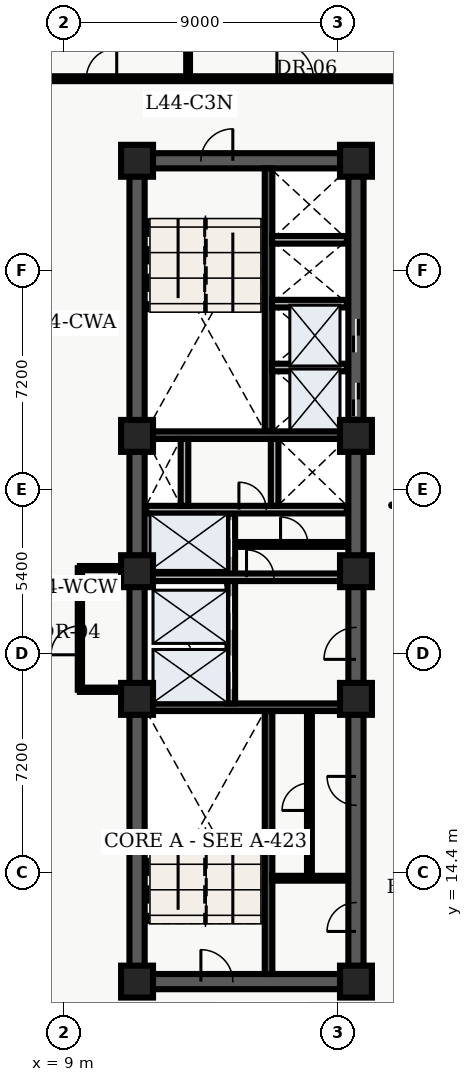
"""IFC4 building model, lengths in metres.
Left out: names, types, materials, properties, quantities, classifications, styles, units other than length and angle.
Written with IfcOpenShell. Run it as: python <this file> out.ifc"""

import sys

from ifc_helpers import new_model, entity, si_unit, converted_unit, direction, frame, origin_with_axes, origin_2d_with_axis, place, context, subcontext, project, spatial, polyline, rectangle, outline, extrude, element, fill, save


model = new_model("IFC4")
c1 = context("Model", 3, precision=1e-05, world=origin_with_axes(), true_north=direction((0.0, 1.0)))
c2 = subcontext(c1, "Body", "Model", "MODEL_VIEW")
j1 = project(units=[si_unit("LENGTHUNIT", "METRE"), converted_unit("PLANEANGLEUNIT", "DEGREE", entity("IfcPlaneAngleMeasure", 0.017), si_unit("PLANEANGLEUNIT", "RADIAN"), dimensions=[0, 0, 0, 0, 0, 0, 0])], contexts=[c1])
p1 = place(None, origin_with_axes())
s1 = spatial("IfcSite", under=j1, at=p1, CompositionType="ELEMENT")
p2 = place(p1, origin_with_axes())
s2 = spatial("IfcBuilding", under=s1, at=p2, CompositionType="ELEMENT")
p3 = place(p2, frame((0.0, 0.0, 179.7), z_axis=(0.0, 0.0, 1.0), x_axis=(1.0, 0.0, 0.0)))
s3 = spatial("IfcBuildingStorey", under=s2, at=p3, CompositionType="ELEMENT", Elevation=179.7)
p4 = place(p3, frame((11.4, 10.8, 0.0), z_axis=(0.0, 0.0, 1.0), x_axis=(0.0, 1.0, 0.0)))
e1 = element("IfcWall", 1, at=p4, inside=s3, PredefinedType="SHEAR", context=c2, shape_type="SweptSolid", body=[
    extrude(outline(polyline([(0.0, -0.25), (27.0, -0.25), (27.0, 0.25), (0.0, 0.25), (0.0, -0.25)])), origin_with_axes(), (0.0, 0.0, 1.0), 3.66),
])
p5 = place(p3, frame((11.4, 10.8, 0.0), z_axis=(0.0, 0.0, 1.0), x_axis=(1.0, 0.0, 0.0)))
e2 = element("IfcWall", 2, at=p5, inside=s3, PredefinedType="SHEAR", context=c2, shape_type="SweptSolid", body=[
    extrude(outline(polyline([(0.0, -0.25), (7.2, -0.25), (7.2, 0.25), (0.0, 0.25), (0.0, -0.25)])), origin_with_axes(), (0.0, 0.0, 1.0), 3.66),
])
p6 = place(p5, frame((2.625, 0.0, 0.0), z_axis=(0.0, 0.0, 1.0), x_axis=(1.0, 0.0, 0.0)))
e3 = element("IfcOpeningElement", 3, at=p6, cuts=e2, PredefinedType="OPENING", context=c2, shape_type="SweptSolid", body=[
    extrude(rectangle(XDim=1.05, YDim=0.52, at=origin_2d_with_axis()), origin_with_axes(), (0.0, 0.0, 1.0), 2.15),
])
p7 = place(p3, frame((11.4, 37.8, 0.0), z_axis=(0.0, 0.0, 1.0), x_axis=(1.0, 0.0, 0.0)))
e4 = element("IfcWall", 4, at=p7, inside=s3, PredefinedType="SHEAR", context=c2, shape_type="SweptSolid", body=[
    extrude(outline(polyline([(0.0, -0.25), (7.2, -0.25), (7.2, 0.25), (0.0, 0.25), (0.0, -0.25)])), origin_with_axes(), (0.0, 0.0, 1.0), 3.66),
])
p8 = place(p7, frame((2.625, 0.0, 0.0), z_axis=(0.0, 0.0, 1.0), x_axis=(1.0, 0.0, 0.0)))
e5 = element("IfcOpeningElement", 5, at=p8, cuts=e4, PredefinedType="OPENING", context=c2, shape_type="SweptSolid", body=[
    extrude(rectangle(XDim=1.05, YDim=0.52, at=origin_2d_with_axis()), origin_with_axes(), (0.0, 0.0, 1.0), 2.15),
])
p9 = place(p3, frame((18.6, 10.8, 0.0), z_axis=(0.0, 0.0, 1.0), x_axis=(0.0, 1.0, 0.0)))
e6 = element("IfcWall", 6, at=p9, inside=s3, PredefinedType="SHEAR", context=c2, shape_type="SweptSolid", body=[
    extrude(outline(polyline([(0.0, -0.25), (13.5, -0.25), (13.5, 0.25), (0.0, 0.25), (0.0, -0.25)])), origin_with_axes(), (0.0, 0.0, 1.0), 3.66),
])
p10 = place(p9, frame((11.125, 0.0, 0.0), z_axis=(0.0, 0.0, 1.0), x_axis=(1.0, 0.0, 0.0)))
e7 = element("IfcOpeningElement", 7, at=p10, cuts=e6, PredefinedType="OPENING", context=c2, shape_type="SweptSolid", body=[
    extrude(rectangle(XDim=1.05, YDim=0.52, at=origin_2d_with_axis()), origin_with_axes(), (0.0, 0.0, 1.0), 2.15),
])
p11 = place(p9, frame((2.125, 0.0, 0.0), z_axis=(0.0, 0.0, 1.0), x_axis=(1.0, 0.0, 0.0)))
e8 = element("IfcOpeningElement", 8, at=p11, cuts=e6, PredefinedType="OPENING", context=c2, shape_type="SweptSolid", body=[
    extrude(rectangle(XDim=0.95, YDim=0.52, at=origin_2d_with_axis()), origin_with_axes(), (0.0, 0.0, 1.0), 2.15),
])
p12 = place(p9, frame((6.275, 0.0, 0.0), z_axis=(0.0, 0.0, 1.0), x_axis=(1.0, 0.0, 0.0)))
e9 = element("IfcOpeningElement", 9, at=p12, cuts=e6, PredefinedType="OPENING", context=c2, shape_type="SweptSolid", body=[
    extrude(rectangle(XDim=0.95, YDim=0.52, at=origin_2d_with_axis()), origin_with_axes(), (0.0, 0.0, 1.0), 2.15),
])
p13 = place(p3, frame((18.6, 24.3, 0.0), z_axis=(0.0, 0.0, 1.0), x_axis=(0.0, 1.0, 0.0)))
e10 = element("IfcWall", 10, at=p13, inside=s3, PredefinedType="SHEAR", context=c2, shape_type="SweptSolid", body=[
    extrude(outline(polyline([(0.0, -0.25), (13.5, -0.25), (13.5, 0.25), (0.0, 0.25), (0.0, -0.25)])), origin_with_axes(), (0.0, 0.0, 1.0), 3.66),
])
p14 = place(p13, frame((5.65, 0.0, 0.0), z_axis=(0.0, 0.0, 1.0), x_axis=(1.0, 0.0, 0.0)))
e11 = element("IfcOpeningElement", 11, at=p14, cuts=e10, PredefinedType="OPENING", context=c2, shape_type="SweptSolid", body=[
    extrude(rectangle(XDim=1.1, YDim=0.52, at=origin_2d_with_axis()), origin_with_axes(), (0.0, 0.0, 1.0), 2.15),
])
p15 = place(p13, frame((7.75, 0.0, 0.0), z_axis=(0.0, 0.0, 1.0), x_axis=(1.0, 0.0, 0.0)))
e12 = element("IfcOpeningElement", 12, at=p15, cuts=e10, PredefinedType="OPENING", context=c2, shape_type="SweptSolid", body=[
    extrude(rectangle(XDim=1.1, YDim=0.52, at=origin_2d_with_axis()), origin_with_axes(), (0.0, 0.0, 1.0), 2.15),
])
p16 = place(p3, frame((15.725, 11.05, 0.0), z_axis=(0.0, 0.0, 1.0), x_axis=(0.0, 1.0, 0.0)))
e13 = element("IfcWall", 13, at=p16, inside=s3, PredefinedType="SHEAR", context=c2, shape_type="SweptSolid", body=[
    extrude(outline(polyline([(0.0, -0.125), (8.65, -0.125), (8.65, 0.125), (0.0, 0.125), (0.0, -0.125)])), origin_with_axes(), (0.0, 0.0, 1.0), 3.66),
])
p17 = place(p3, frame((11.65, 19.825, 0.0), z_axis=(0.0, 0.0, 1.0), x_axis=(1.0, 0.0, 0.0)))
e14 = element("IfcWall", 14, at=p17, inside=s3, PredefinedType="SHEAR", context=c2, shape_type="SweptSolid", body=[
    extrude(outline(polyline([(0.0, -0.125), (6.7, -0.125), (6.7, 0.125), (0.0, 0.125), (0.0, -0.125)])), origin_with_axes(), (0.0, 0.0, 1.0), 3.66),
])
p18 = place(p3, frame((15.725, 28.9, 0.0), z_axis=(0.0, 0.0, 1.0), x_axis=(0.0, 1.0, 0.0)))
e15 = element("IfcWall", 15, at=p18, inside=s3, PredefinedType="SHEAR", context=c2, shape_type="SweptSolid", body=[
    extrude(outline(polyline([(0.0, -0.125), (8.65, -0.125), (8.65, 0.125), (0.0, 0.125), (0.0, -0.125)])), origin_with_axes(), (0.0, 0.0, 1.0), 3.66),
])
p19 = place(p3, frame((11.65, 28.775, 0.0), z_axis=(0.0, 0.0, 1.0), x_axis=(1.0, 0.0, 0.0)))
e16 = element("IfcWall", 16, at=p19, inside=s3, PredefinedType="SHEAR", context=c2, shape_type="SweptSolid", body=[
    extrude(outline(polyline([(0.0, -0.125), (6.7, -0.125), (6.7, 0.125), (0.0, 0.125), (0.0, -0.125)])), origin_with_axes(), (0.0, 0.0, 1.0), 3.66),
])
p20 = place(p3, frame((14.5, 19.95, 0.0), z_axis=(0.0, 0.0, 1.0), x_axis=(0.0, 1.0, 0.0)))
e17 = element("IfcWall", 17, at=p20, inside=s3, PredefinedType="SOLIDWALL", context=c2, shape_type="SweptSolid", body=[
    extrude(outline(polyline([(0.0, -0.125), (6.25, -0.125), (6.25, 0.125), (0.0, 0.125), (0.0, -0.125)])), origin_with_axes(), (0.0, 0.0, 1.0), 2.7),
])
p21 = place(p20, frame((1.025, 0.0, 0.0), z_axis=(0.0, 0.0, 1.0), x_axis=(1.0, 0.0, 0.0)))
e18 = element("IfcOpeningElement", 18, at=p21, cuts=e17, PredefinedType="OPENING", context=c2, shape_type="SweptSolid", body=[
    extrude(rectangle(XDim=1.1, YDim=0.27, at=origin_2d_with_axis()), origin_with_axes(), (0.0, 0.0, 1.0), 2.15),
])
p22 = place(p20, frame((2.975, 0.0, 0.0), z_axis=(0.0, 0.0, 1.0), x_axis=(1.0, 0.0, 0.0)))
e19 = element("IfcOpeningElement", 19, at=p22, cuts=e17, PredefinedType="OPENING", context=c2, shape_type="SweptSolid", body=[
    extrude(rectangle(XDim=1.1, YDim=0.27, at=origin_2d_with_axis()), origin_with_axes(), (0.0, 0.0, 1.0), 2.15),
])
p23 = place(p20, frame((5.425, 0.0, 0.0), z_axis=(0.0, 0.0, 1.0), x_axis=(1.0, 0.0, 0.0)))
e20 = element("IfcOpeningElement", 20, at=p23, cuts=e17, PredefinedType="OPENING", context=c2, shape_type="SweptSolid", body=[
    extrude(rectangle(XDim=1.2, YDim=0.27, at=origin_2d_with_axis()), origin_with_axes(), (0.0, 0.0, 1.0), 2.15),
])
p24 = place(p3, frame((11.7, 24.1, 0.0), z_axis=(0.0, 0.0, 1.0), x_axis=(1.0, 0.0, 0.0)))
e21 = element("IfcWall", 21, at=p24, inside=s3, PredefinedType="SOLIDWALL", context=c2, shape_type="SweptSolid", body=[
    extrude(outline(polyline([(0.0, -0.125), (6.6, -0.125), (6.6, 0.125), (0.0, 0.125), (0.0, -0.125)])), origin_with_axes(), (0.0, 0.0, 1.0), 2.7),
])
p25 = place(p24, frame((3.75, 0.0, 0.0), z_axis=(0.0, 0.0, 1.0), x_axis=(1.0, 0.0, 0.0)))
e22 = element("IfcOpeningElement", 22, at=p25, cuts=e21, PredefinedType="OPENING", context=c2, shape_type="SweptSolid", body=[
    extrude(rectangle(XDim=0.9, YDim=0.27, at=origin_2d_with_axis()), origin_with_axes(), (0.0, 0.0, 1.0), 2.15),
])
p26 = place(p3, frame((11.7, 26.325, 0.0), z_axis=(0.0, 0.0, 1.0), x_axis=(1.0, 0.0, 0.0)))
e23 = element("IfcWall", 23, at=p26, inside=s3, PredefinedType="SOLIDWALL", context=c2, shape_type="SweptSolid", body=[
    extrude(outline(polyline([(0.0, -0.125), (6.6, -0.125), (6.6, 0.125), (0.0, 0.125), (0.0, -0.125)])), origin_with_axes(), (0.0, 0.0, 1.0), 2.7),
])
p27 = place(p26, frame((3.5, 0.0, 0.0), z_axis=(0.0, 0.0, 1.0), x_axis=(1.0, 0.0, 0.0)))
e24 = element("IfcOpeningElement", 24, at=p27, cuts=e23, PredefinedType="OPENING", context=c2, shape_type="SweptSolid", body=[
    extrude(rectangle(XDim=0.9, YDim=0.27, at=origin_2d_with_axis()), origin_with_axes(), (0.0, 0.0, 1.0), 2.15),
])
for number, where, z_axis, x_axis in (
    (25, (12.96, 26.45, 0.0), (0.0, 0.0, 1.0), (0.0, 1.0, 0.0)),
    (26, (15.925, 26.45, 0.0), (0.0, 0.0, 1.0), (0.0, 1.0, 0.0)),
):
    element("IfcWall", number, at=place(p3, frame(where, z_axis=z_axis, x_axis=x_axis)), inside=s3, PredefinedType="SOLIDWALL", context=c2, shape_type="SweptSolid", body=[
        extrude(outline(polyline([(0.0, -0.125), (2.2, -0.125), (2.2, 0.125), (0.0, 0.125), (0.0, -0.125)])), origin_with_axes(), (0.0, 0.0, 1.0), 2.7),
    ])
for number, where, z_axis, x_axis in (
    (27, (11.4, 10.8, 0.0), (0.0, 0.0, 1.0), (1.0, 0.0, 0.0)),
    (28, (11.4, 20.1, 0.0), (0.0, 0.0, 1.0), (1.0, 0.0, 0.0)),
    (29, (11.4, 24.3, 0.0), (0.0, 0.0, 1.0), (1.0, 0.0, 0.0)),
    (30, (11.4, 28.75, 0.0), (0.0, 0.0, 1.0), (1.0, 0.0, 0.0)),
    (31, (11.4, 37.8, 0.0), (0.0, 0.0, 1.0), (1.0, 0.0, 0.0)),
    (32, (18.6, 10.8, 0.0), (0.0, 0.0, 1.0), (1.0, 0.0, 0.0)),
    (33, (18.6, 20.1, 0.0), (0.0, 0.0, 1.0), (1.0, 0.0, 0.0)),
    (34, (18.6, 24.3, 0.0), (0.0, 0.0, 1.0), (1.0, 0.0, 0.0)),
    (35, (18.6, 28.75, 0.0), (0.0, 0.0, 1.0), (1.0, 0.0, 0.0)),
    (36, (18.6, 37.8, 0.0), (0.0, 0.0, 1.0), (1.0, 0.0, 0.0)),
):
    element("IfcColumn", number, at=place(p3, frame(where, z_axis=z_axis, x_axis=x_axis)), inside=s3, PredefinedType="COLUMN", context=c2, shape_type="SweptSolid", body=[
        extrude(rectangle(XDim=1.05, YDim=1.05, at=origin_2d_with_axis()), origin_with_axes(), (0.0, 0.0, 1.0), 3.9),
    ])
p28 = place(p3, frame((14.62, 25.18, 0.0), z_axis=(0.0, 0.0, 1.0), x_axis=(1.0, 0.0, 0.0)))
e37 = element("IfcWall", 37, at=p28, inside=s3, PredefinedType="PARTITIONING", context=c2, shape_type="SweptSolid", body=[
    extrude(outline(polyline([(0.0, -0.08), (3.68, -0.08), (3.68, 0.08), (0.0, 0.08), (0.0, -0.08)])), origin_with_axes(), (0.0, 0.0, 1.0), 2.7),
])
p29 = place(p28, frame((1.95, 0.0, 0.0), z_axis=(0.0, 0.0, 1.0), x_axis=(1.0, 0.0, 0.0)))
e38 = element("IfcOpeningElement", 38, at=p29, cuts=e37, PredefinedType="OPENING", context=c2, shape_type="SweptSolid", body=[
    extrude(rectangle(XDim=0.9, YDim=0.18, at=origin_2d_with_axis()), origin_with_axes(), (0.0, 0.0, 1.0), 2.15),
])
p30 = place(p3, frame((15.84, 14.2, 0.0), z_axis=(0.0, 0.0, 1.0), x_axis=(1.0, 0.0, 0.0)))
e39 = element("IfcWall", 39, at=p30, inside=s3, PredefinedType="PARTITIONING", context=c2, shape_type="SweptSolid", body=[
    extrude(outline(polyline([(0.0, -0.08), (2.46, -0.08), (2.46, 0.08), (0.0, 0.08), (0.0, -0.08)])), origin_with_axes(), (0.0, 0.0, 1.0), 2.7),
])
p31 = place(p3, frame((17.07, 14.28, 0.0), z_axis=(0.0, 0.0, 1.0), x_axis=(0.0, 1.0, 0.0)))
e40 = element("IfcWall", 40, at=p31, inside=s3, PredefinedType="PARTITIONING", context=c2, shape_type="SweptSolid", body=[
    extrude(outline(polyline([(0.0, -0.08), (5.42, -0.08), (5.42, 0.08), (0.0, 0.08), (0.0, -0.08)])), origin_with_axes(), (0.0, 0.0, 1.0), 2.7),
])
p32 = place(p31, frame((2.6, 0.0, 0.0), z_axis=(0.0, 0.0, 1.0), x_axis=(1.0, 0.0, 0.0)))
e41 = element("IfcOpeningElement", 41, at=p32, cuts=e40, PredefinedType="OPENING", context=c2, shape_type="SweptSolid", body=[
    extrude(rectangle(XDim=0.9, YDim=0.18, at=origin_2d_with_axis()), origin_with_axes(), (0.0, 0.0, 1.0), 2.15),
])
for number, where, z_axis, x_axis in (
    (42, (15.84, 31.0, 0.0), (0.0, 0.0, 1.0), (1.0, 0.0, 0.0)),
    (43, (15.84, 33.1, 0.0), (0.0, 0.0, 1.0), (1.0, 0.0, 0.0)),
    (44, (15.84, 35.2, 0.0), (0.0, 0.0, 1.0), (1.0, 0.0, 0.0)),
):
    element("IfcWall", number, at=place(p3, frame(where, z_axis=z_axis, x_axis=x_axis)), inside=s3, PredefinedType="SOLIDWALL", context=c2, shape_type="SweptSolid", body=[
        extrude(outline(polyline([(0.0, -0.125), (2.46, -0.125), (2.46, 0.125), (0.0, 0.125), (0.0, -0.125)])), origin_with_axes(), (0.0, 0.0, 1.0), 2.7),
    ])
p33 = place(p3, frame((9.52, 20.4, 0.0), z_axis=(0.0, 0.0, 1.0), x_axis=(0.0, 1.0, 0.0)))
e45 = element("IfcWall", 45, at=p33, inside=s3, PredefinedType="PARTITIONING", context=c2, shape_type="SweptSolid", body=[
    extrude(outline(polyline([(0.0, -0.07), (4.0, -0.07), (4.0, 0.07), (0.0, 0.07), (0.0, -0.07)])), origin_with_axes(), (0.0, 0.0, 1.0), 2.7),
])
p34 = place(p33, frame((1.625, 0.0, 0.0), z_axis=(0.0, 0.0, 1.0), x_axis=(1.0, 0.0, 0.0)))
e46 = element("IfcOpeningElement", 46, at=p34, cuts=e45, PredefinedType="OPENING", context=c2, shape_type="SweptSolid", body=[
    extrude(rectangle(XDim=0.95, YDim=0.16, at=origin_2d_with_axis()), origin_with_axes(), (0.0, 0.0, 1.0), 2.15),
])
for number, where, z_axis, x_axis in (
    (47, (9.52, 20.4, 0.0), (0.0, 0.0, 1.0), (1.0, 0.0, 0.0)),
    (48, (9.52, 24.4, 0.0), (0.0, 0.0, 1.0), (1.0, 0.0, 0.0)),
):
    element("IfcWall", number, at=place(p3, frame(where, z_axis=z_axis, x_axis=x_axis)), inside=s3, PredefinedType="PARTITIONING", context=c2, shape_type="SweptSolid", body=[
        extrude(outline(polyline([(0.0, -0.07), (1.58, -0.07), (1.58, 0.07), (0.0, 0.07), (0.0, -0.07)])), origin_with_axes(), (0.0, 0.0, 1.0), 2.7),
    ])
p35 = place(p3, frame((2.6, 40.5, 0.0), z_axis=(0.0, 0.0, 1.0), x_axis=(1.0, 0.0, 0.0)))
e49 = element("IfcWall", 49, at=p35, inside=s3, PredefinedType="PARTITIONING", context=c2, shape_type="SweptSolid", body=[
    extrude(outline(polyline([(0.0, -0.08), (22.87, -0.08), (22.87, 0.08), (0.0, 0.08), (0.0, -0.08)])), origin_with_axes(), (0.0, 0.0, 1.0), 2.7),
])
p36 = place(p35, frame((2.386, 0.0, 0.0), z_axis=(0.0, 0.0, 1.0), x_axis=(1.0, 0.0, 0.0)))
e50 = element("IfcOpeningElement", 50, at=p36, cuts=e49, PredefinedType="OPENING", context=c2, shape_type="SweptSolid", body=[
    extrude(rectangle(XDim=1.0, YDim=0.18, at=origin_2d_with_axis()), origin_with_axes(), (0.0, 0.0, 1.0), 2.15),
])
p37 = place(p35, frame((7.631, 0.0, 0.0), z_axis=(0.0, 0.0, 1.0), x_axis=(1.0, 0.0, 0.0)))
e51 = element("IfcOpeningElement", 51, at=p37, cuts=e49, PredefinedType="OPENING", context=c2, shape_type="SweptSolid", body=[
    extrude(rectangle(XDim=1.0, YDim=0.18, at=origin_2d_with_axis()), origin_with_axes(), (0.0, 0.0, 1.0), 2.15),
])
p38 = place(p35, frame((13.999, 0.0, 0.0), z_axis=(0.0, 0.0, 1.0), x_axis=(1.0, 0.0, 0.0)))
e52 = element("IfcOpeningElement", 52, at=p38, cuts=e49, PredefinedType="OPENING", context=c2, shape_type="SweptSolid", body=[
    extrude(rectangle(XDim=1.2, YDim=0.18, at=origin_2d_with_axis()), origin_with_axes(), (0.0, 0.0, 1.0), 2.2),
])
p39 = place(p3, frame((13.079, 40.6, 0.0), z_axis=(0.0, 0.0, 1.0), x_axis=(0.0, 1.0, 0.0)))
e53 = element("IfcWall", 53, at=p39, inside=s3, PredefinedType="PARTITIONING", context=c2, shape_type="SweptSolid", body=[
    extrude(outline(polyline([(0.0, -0.062), (7.665, -0.062), (7.665, 0.062), (0.0, 0.062), (0.0, -0.062)])), origin_with_axes(), (0.0, 0.0, 1.0), 2.7),
])
p40 = place(p13, frame((5.65, 0.0, 0.0), z_axis=(0.0, 0.0, 1.0), x_axis=(1.0, 0.0, 0.0)))
e54 = element("IfcDoor", 54, at=p40, inside=s3, OperationType="SLIDING_TO_LEFT", PredefinedType="DOOR", context=c2, shape_type="SweptSolid", body=[
    extrude(rectangle(XDim=1.1, YDim=0.09, at=origin_2d_with_axis()), origin_with_axes(), (0.0, 0.0, 1.0), 2.15),
])
fill(e11, e54)
p41 = place(p13, frame((7.75, 0.0, 0.0), z_axis=(0.0, 0.0, 1.0), x_axis=(1.0, 0.0, 0.0)))
e55 = element("IfcDoor", 55, at=p41, inside=s3, OperationType="SLIDING_TO_RIGHT", PredefinedType="DOOR", context=c2, shape_type="SweptSolid", body=[
    extrude(rectangle(XDim=1.1, YDim=0.09, at=origin_2d_with_axis()), origin_with_axes(), (0.0, 0.0, 1.0), 2.15),
])
fill(e12, e55)
p42 = place(p20, frame((1.025, 0.0, 0.0), z_axis=(0.0, 0.0, 1.0), x_axis=(1.0, 0.0, 0.0)))
e56 = element("IfcDoor", 56, at=p42, inside=s3, OperationType="SLIDING_TO_LEFT", PredefinedType="DOOR", context=c2, shape_type="SweptSolid", body=[
    extrude(rectangle(XDim=1.1, YDim=0.09, at=origin_2d_with_axis()), origin_with_axes(), (0.0, 0.0, 1.0), 2.15),
])
fill(e18, e56)
p43 = place(p20, frame((2.975, 0.0, 0.0), z_axis=(0.0, 0.0, 1.0), x_axis=(1.0, 0.0, 0.0)))
e57 = element("IfcDoor", 57, at=p43, inside=s3, OperationType="SLIDING_TO_RIGHT", PredefinedType="DOOR", context=c2, shape_type="SweptSolid", body=[
    extrude(rectangle(XDim=1.1, YDim=0.09, at=origin_2d_with_axis()), origin_with_axes(), (0.0, 0.0, 1.0), 2.15),
])
fill(e19, e57)
p44 = place(p20, frame((5.425, 0.0, 0.0), z_axis=(0.0, 0.0, 1.0), x_axis=(1.0, 0.0, 0.0)))
e58 = element("IfcDoor", 58, at=p44, inside=s3, OperationType="DOUBLE_DOOR_SLIDING", PredefinedType="DOOR", context=c2, shape_type="SweptSolid", body=[
    extrude(rectangle(XDim=1.2, YDim=0.09, at=origin_2d_with_axis()), origin_with_axes(), (0.0, 0.0, 1.0), 2.15),
])
fill(e20, e58)
p45 = place(p5, frame((2.625, 0.0, 0.0), z_axis=(0.0, 0.0, 1.0), x_axis=(1.0, 0.0, 0.0)))
e59 = element("IfcDoor", 59, at=p45, inside=s3, OperationType="SINGLE_SWING_LEFT", PredefinedType="DOOR", context=c2, shape_type="SweptSolid", body=[
    extrude(rectangle(XDim=1.05, YDim=0.09, at=origin_2d_with_axis()), origin_with_axes(), (0.0, 0.0, 1.0), 2.15),
])
fill(e3, e59)
p46 = place(p7, frame((2.625, 0.0, 0.0), z_axis=(0.0, 0.0, 1.0), x_axis=(1.0, 0.0, 0.0)))
e60 = element("IfcDoor", 60, at=p46, inside=s3, OperationType="SINGLE_SWING_RIGHT", PredefinedType="DOOR", context=c2, shape_type="SweptSolid", body=[
    extrude(rectangle(XDim=1.05, YDim=0.09, at=origin_2d_with_axis()), origin_with_axes(), (0.0, 0.0, 1.0), 2.15),
])
fill(e5, e60)
p47 = place(p9, frame((11.125, 0.0, 0.0), z_axis=(0.0, 0.0, 1.0), x_axis=(1.0, 0.0, 0.0)))
e61 = element("IfcDoor", 61, at=p47, inside=s3, OperationType="SINGLE_SWING_LEFT", PredefinedType="DOOR", context=c2, shape_type="SweptSolid", body=[
    extrude(rectangle(XDim=1.05, YDim=0.09, at=origin_2d_with_axis()), origin_with_axes(), (0.0, 0.0, 1.0), 2.15),
])
fill(e7, e61)
p48 = place(p26, frame((3.5, 0.0, 0.0), z_axis=(0.0, 0.0, 1.0), x_axis=(1.0, 0.0, 0.0)))
e62 = element("IfcDoor", 62, at=p48, inside=s3, OperationType="SINGLE_SWING_LEFT", PredefinedType="DOOR", context=c2, shape_type="SweptSolid", body=[
    extrude(rectangle(XDim=0.9, YDim=0.09, at=origin_2d_with_axis()), origin_with_axes(), (0.0, 0.0, 1.0), 2.15),
])
fill(e24, e62)
p49 = place(p24, frame((3.75, 0.0, 0.0), z_axis=(0.0, 0.0, 1.0), x_axis=(1.0, 0.0, 0.0)))
e63 = element("IfcDoor", 63, at=p49, inside=s3, OperationType="SINGLE_SWING_LEFT", PredefinedType="DOOR", context=c2, shape_type="SweptSolid", body=[
    extrude(rectangle(XDim=0.9, YDim=0.09, at=origin_2d_with_axis()), origin_with_axes(), (0.0, 0.0, 1.0), 2.15),
])
fill(e22, e63)
p50 = place(p28, frame((1.95, 0.0, 0.0), z_axis=(0.0, 0.0, 1.0), x_axis=(1.0, 0.0, 0.0)))
e64 = element("IfcDoor", 64, at=p50, inside=s3, OperationType="SINGLE_SWING_LEFT", PredefinedType="DOOR", context=c2, shape_type="SweptSolid", body=[
    extrude(rectangle(XDim=0.9, YDim=0.09, at=origin_2d_with_axis()), origin_with_axes(), (0.0, 0.0, 1.0), 2.15),
])
fill(e38, e64)
p51 = place(p9, frame((2.125, 0.0, 0.0), z_axis=(0.0, 0.0, 1.0), x_axis=(1.0, 0.0, 0.0)))
e65 = element("IfcDoor", 65, at=p51, inside=s3, OperationType="SINGLE_SWING_LEFT", PredefinedType="DOOR", context=c2, shape_type="SweptSolid", body=[
    extrude(rectangle(XDim=0.95, YDim=0.09, at=origin_2d_with_axis()), origin_with_axes(), (0.0, 0.0, 1.0), 2.15),
])
fill(e8, e65)
p52 = place(p31, frame((2.6, 0.0, 0.0), z_axis=(0.0, 0.0, 1.0), x_axis=(1.0, 0.0, 0.0)))
e66 = element("IfcDoor", 66, at=p52, inside=s3, OperationType="SINGLE_SWING_LEFT", PredefinedType="DOOR", context=c2, shape_type="SweptSolid", body=[
    extrude(rectangle(XDim=0.9, YDim=0.09, at=origin_2d_with_axis()), origin_with_axes(), (0.0, 0.0, 1.0), 2.15),
])
fill(e41, e66)
p53 = place(p9, frame((6.275, 0.0, 0.0), z_axis=(0.0, 0.0, 1.0), x_axis=(1.0, 0.0, 0.0)))
e67 = element("IfcDoor", 67, at=p53, inside=s3, OperationType="SINGLE_SWING_RIGHT", PredefinedType="DOOR", context=c2, shape_type="SweptSolid", body=[
    extrude(rectangle(XDim=0.95, YDim=0.09, at=origin_2d_with_axis()), origin_with_axes(), (0.0, 0.0, 1.0), 2.15),
])
fill(e9, e67)
p54 = place(p33, frame((1.625, 0.0, 0.0), z_axis=(0.0, 0.0, 1.0), x_axis=(1.0, 0.0, 0.0)))
e68 = element("IfcDoor", 68, at=p54, inside=s3, OperationType="SINGLE_SWING_LEFT", PredefinedType="DOOR", context=c2, shape_type="SweptSolid", body=[
    extrude(rectangle(XDim=0.95, YDim=0.084, at=origin_2d_with_axis()), origin_with_axes(), (0.0, 0.0, 1.0), 2.15),
])
fill(e46, e68)
p55 = place(p35, frame((7.631, 0.0, 0.0), z_axis=(0.0, 0.0, 1.0), x_axis=(1.0, 0.0, 0.0)))
e69 = element("IfcDoor", 69, at=p55, inside=s3, OperationType="SINGLE_SWING_RIGHT", PredefinedType="DOOR", context=c2, shape_type="SweptSolid", body=[
    extrude(rectangle(XDim=1.0, YDim=0.09, at=origin_2d_with_axis()), origin_with_axes(), (0.0, 0.0, 1.0), 2.15),
])
fill(e51, e69)
p56 = place(p35, frame((13.999, 0.0, 0.0), z_axis=(0.0, 0.0, 1.0), x_axis=(1.0, 0.0, 0.0)))
e70 = element("IfcDoor", 70, at=p56, inside=s3, OperationType="SINGLE_SWING_LEFT", PredefinedType="DOOR", context=c2, shape_type="SweptSolid", body=[
    extrude(rectangle(XDim=1.2, YDim=0.09, at=origin_2d_with_axis()), origin_with_axes(), (0.0, 0.0, 1.0), 2.2),
])
fill(e52, e70)
save(model, sys.argv[1])
